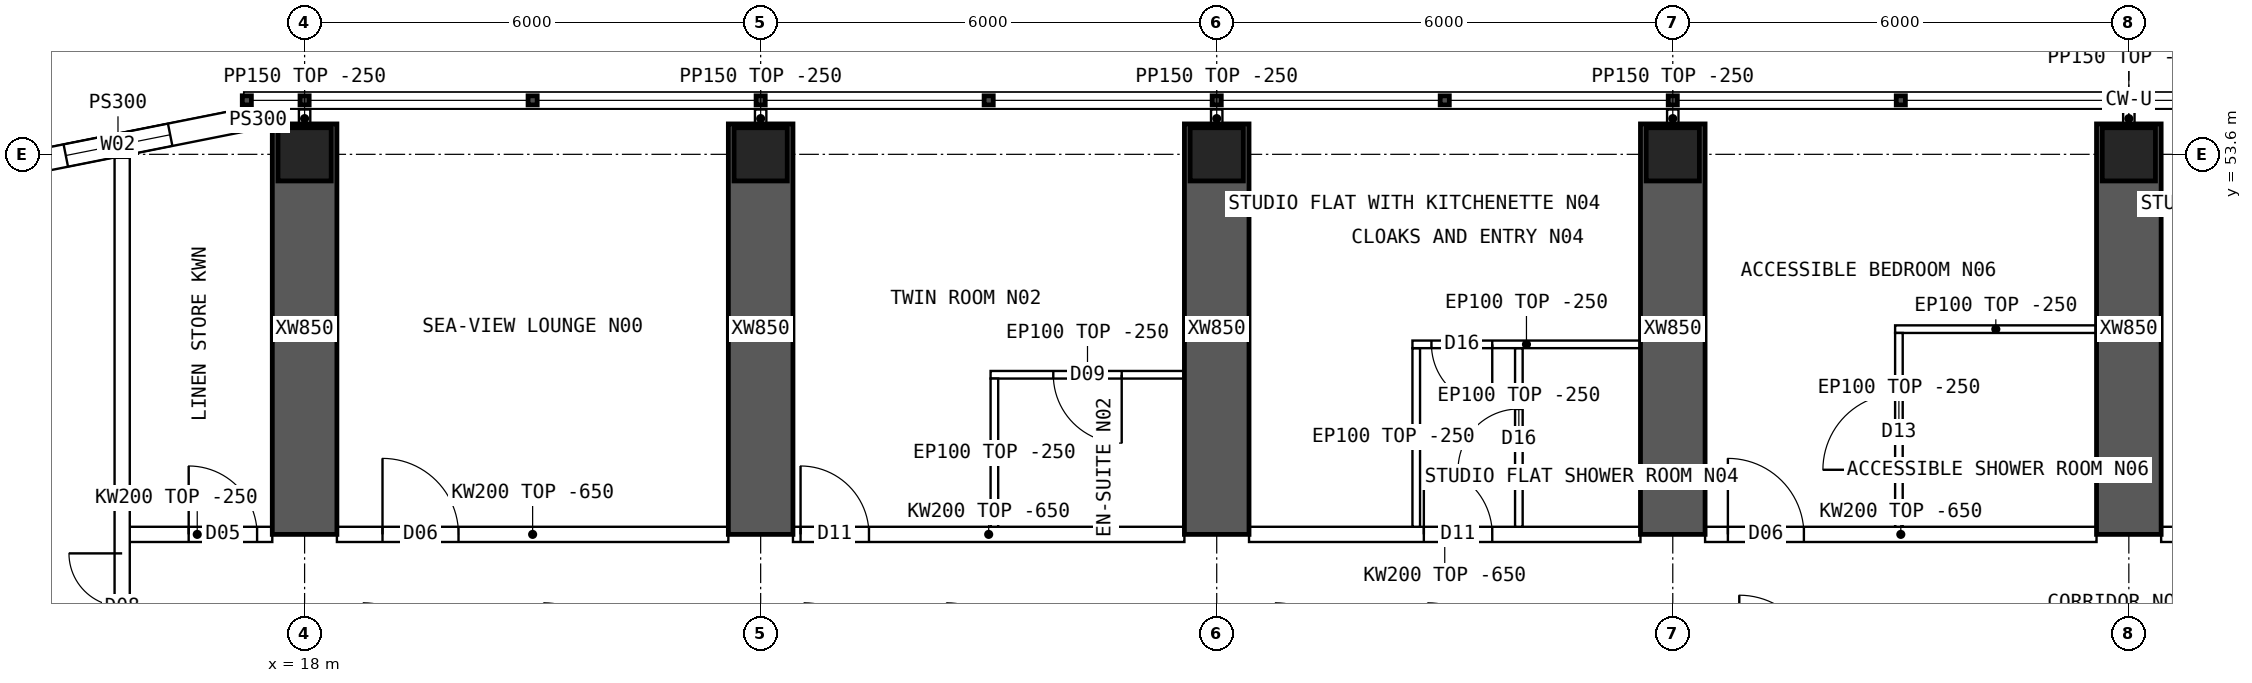
"""IFC4 building model, lengths in metres.
Left out: names, types, materials, properties, quantities, classifications, styles, units other than length and angle.
Written with IfcOpenShell. Run it as: python <this file> out.ifc"""

import sys

from ifc_helpers import new_model, si_unit, direction, frame, frame_2d, origin, origin_2d, place, context, subcontext, project, spatial, polyline, rectangle, hollow_rectangle, outline, extrude, element, fill, save


model = new_model("IFC4")
c1 = context("Model", 3, precision=1e-05, world=origin(), true_north=direction((0.0, 1.0)))
c2 = subcontext(c1, "Body", "Model", "MODEL_VIEW")
j1 = project(units=[si_unit("LENGTHUNIT", "METRE"), si_unit("PLANEANGLEUNIT", "RADIAN")], contexts=[c1])
p1 = place(None, origin())
s1 = spatial("IfcSite", under=j1, at=p1, CompositionType="ELEMENT")
p2 = place(p1, origin())
s2 = spatial("IfcBuilding", under=s1, at=p2, CompositionType="ELEMENT")
p3 = place(p2, frame((0.0, 0.0, 163.6)))
s3 = spatial("IfcBuildingStorey", under=s2, at=p3, CompositionType="ELEMENT", Elevation=163.6)
for number, where, z_axis, x_axis in (
    (1, (18.0, 53.6, 0.0), (0.0, 0.0, 1.0), (1.0, 0.0, 0.0)),
    (2, (24.0, 53.6, 0.0), (0.0, 0.0, 1.0), (1.0, 0.0, 0.0)),
    (3, (30.0, 53.6, 0.0), (0.0, 0.0, 1.0), (1.0, 0.0, 0.0)),
    (4, (36.0, 53.6, 0.0), (0.0, 0.0, 1.0), (1.0, 0.0, 0.0)),
    (5, (42.0, 53.6, 0.0), (0.0, 0.0, 1.0), (1.0, 0.0, 0.0)),
):
    element("IfcColumn", number, at=place(p3, frame(where, z_axis=z_axis, x_axis=x_axis)), inside=s3, PredefinedType="COLUMN", context=c2, shape_type="SweptSolid", body=[
        extrude(hollow_rectangle(XDim=0.7, YDim=0.7, WallThickness=0.07, at=origin_2d()), origin(), (0.0, 0.0, 1.0), 3.75),
    ])
for number, where, z_axis, x_axis in (
    (6, (18.0, 48.6, 0.0), (0.0, 0.0, 1.0), (0.0, 1.0, 0.0)),
    (7, (24.0, 48.6, 0.0), (0.0, 0.0, 1.0), (0.0, 1.0, 0.0)),
    (8, (30.0, 48.6, 0.0), (0.0, 0.0, 1.0), (0.0, 1.0, 0.0)),
    (9, (36.0, 48.6, 0.0), (0.0, 0.0, 1.0), (0.0, 1.0, 0.0)),
    (10, (42.0, 48.6, 0.0), (0.0, 0.0, 1.0), (0.0, 1.0, 0.0)),
):
    element("IfcWall", number, at=place(p3, frame(where, z_axis=z_axis, x_axis=x_axis)), inside=s3, PredefinedType="SHEAR", context=c2, shape_type="SweptSolid", body=[
        extrude(rectangle(XDim=5.4, YDim=0.85, at=frame_2d((2.7, 0.0))), origin(), (0.0, 0.0, 1.0), 3.75),
    ])
p4 = place(p3, frame((17.2, 54.05, 0.0), z_axis=(0.0, 0.0, 1.0), x_axis=(-0.98078325777, -0.195100490205, 0.0)))
e11 = element("IfcWall", 11, at=p4, inside=s3, PredefinedType="SOLIDWALL", context=c2, shape_type="SweptSolid", body=[
    extrude(outline(polyline([(-0.03, -0.15), (3.405, -0.15), (3.345, 0.15), (0.03, 0.15), (-0.03, -0.15)])), origin(), (0.0, 0.0, 1.0), 3.5),
])
p5 = place(p4, frame((0.988, 0.0, 0.9)))
e12 = element("IfcOpeningElement", 12, at=p5, cuts=e11, PredefinedType="OPENING", context=c2, shape_type="SweptSolid", body=[
    extrude(rectangle(XDim=1.4, YDim=1.8, at=frame_2d((0.7, 0.9))), frame((0.0, 0.16, 0.0), z_axis=(0.0, -1.0, 0.0), x_axis=(1.0, 0.0, 0.0)), (0.0, 0.0, 1.0), 0.32),
])
p6 = place(p3, frame((17.2, 54.05, 0.0), z_axis=(0.0, 0.0, 1.0), x_axis=(1.0, 0.0, 0.0)))
e13 = element("IfcWall", 13, at=p6, inside=s3, PredefinedType="SOLIDWALL", context=c2, shape_type="SweptSolid", body=[
    extrude(rectangle(XDim=0.375, YDim=0.3, at=frame_2d((0.188, 0.0))), origin(), (0.0, 0.0, 1.0), 3.5),
])
p7 = place(p3, frame((15.6, 48.6, 0.0), z_axis=(0.0, 0.0, 1.0), x_axis=(1.0, 0.0, 0.0)))
e14 = element("IfcWall", 14, at=p7, inside=s3, PredefinedType="SOLIDWALL", context=c2, shape_type="SweptSolid", body=[
    extrude(rectangle(XDim=1.975, YDim=0.2, at=frame_2d((0.987, 0.0))), origin(), (0.0, 0.0, 1.0), 3.5),
])
p8 = place(p7, frame((0.875, 0.0, 0.0)))
e15 = element("IfcOpeningElement", 15, at=p8, cuts=e14, PredefinedType="OPENING", context=c2, shape_type="SweptSolid", body=[
    extrude(rectangle(XDim=0.9, YDim=2.1, at=frame_2d((0.45, 1.05))), frame((0.0, 0.11, 0.0), z_axis=(0.0, -1.0, 0.0), x_axis=(1.0, 0.0, 0.0)), (0.0, 0.0, 1.0), 0.22),
])
p9 = place(p3, frame((18.425, 48.6, 0.0), z_axis=(0.0, 0.0, 1.0), x_axis=(1.0, 0.0, 0.0)))
e16 = element("IfcWall", 16, at=p9, inside=s3, PredefinedType="SOLIDWALL", context=c2, shape_type="SweptSolid", body=[
    extrude(outline(polyline([(0.0, 0.0), (5.15, 0.0), (5.15, 3.1), (0.0, 3.1), (0.0, 0.0)])), frame((0.0, 0.1, 0.0), z_axis=(0.0, -1.0, 0.0), x_axis=(1.0, 0.0, 0.0)), (0.0, 0.0, 1.0), 0.2),
])
p10 = place(p9, frame((0.6, 0.0, 0.0)))
e17 = element("IfcOpeningElement", 17, at=p10, cuts=e16, PredefinedType="OPENING", context=c2, shape_type="SweptSolid", body=[
    extrude(rectangle(XDim=1.0, YDim=2.1, at=frame_2d((0.5, 1.05))), frame((0.0, 0.11, 0.0), z_axis=(0.0, -1.0, 0.0), x_axis=(1.0, 0.0, 0.0)), (0.0, 0.0, 1.0), 0.22),
])
p11 = place(p3, frame((24.425, 48.6, 0.0), z_axis=(0.0, 0.0, 1.0), x_axis=(1.0, 0.0, 0.0)))
e18 = element("IfcWall", 18, at=p11, inside=s3, PredefinedType="SOLIDWALL", context=c2, shape_type="SweptSolid", body=[
    extrude(outline(polyline([(0.0, 0.0), (5.15, 0.0), (5.15, 3.1), (0.0, 3.1), (0.0, 0.0)])), frame((0.0, 0.1, 0.0), z_axis=(0.0, -1.0, 0.0), x_axis=(1.0, 0.0, 0.0)), (0.0, 0.0, 1.0), 0.2),
])
p12 = place(p11, frame((0.1, 0.0, 0.0)))
e19 = element("IfcOpeningElement", 19, at=p12, cuts=e18, PredefinedType="OPENING", context=c2, shape_type="SweptSolid", body=[
    extrude(rectangle(XDim=0.9, YDim=2.1, at=frame_2d((0.45, 1.05))), frame((0.0, 0.11, 0.0), z_axis=(0.0, -1.0, 0.0), x_axis=(1.0, 0.0, 0.0)), (0.0, 0.0, 1.0), 0.22),
])
p13 = place(p3, frame((30.425, 48.6, 0.0), z_axis=(0.0, 0.0, 1.0), x_axis=(1.0, 0.0, 0.0)))
e20 = element("IfcWall", 20, at=p13, inside=s3, PredefinedType="SOLIDWALL", context=c2, shape_type="SweptSolid", body=[
    extrude(outline(polyline([(0.0, 0.0), (5.15, 0.0), (5.15, 3.1), (0.0, 3.1), (0.0, 0.0)])), frame((0.0, 0.1, 0.0), z_axis=(0.0, -1.0, 0.0), x_axis=(1.0, 0.0, 0.0)), (0.0, 0.0, 1.0), 0.2),
])
p14 = place(p13, frame((2.3, 0.0, 0.0)))
e21 = element("IfcOpeningElement", 21, at=p14, cuts=e20, PredefinedType="OPENING", context=c2, shape_type="SweptSolid", body=[
    extrude(rectangle(XDim=0.9, YDim=2.1, at=frame_2d((0.45, 1.05))), frame((0.0, 0.11, 0.0), z_axis=(0.0, -1.0, 0.0), x_axis=(1.0, 0.0, 0.0)), (0.0, 0.0, 1.0), 0.22),
])
p15 = place(p3, frame((36.425, 48.6, 0.0), z_axis=(0.0, 0.0, 1.0), x_axis=(1.0, 0.0, 0.0)))
e22 = element("IfcWall", 22, at=p15, inside=s3, PredefinedType="SOLIDWALL", context=c2, shape_type="SweptSolid", body=[
    extrude(outline(polyline([(0.0, 0.0), (5.15, 0.0), (5.15, 3.1), (0.0, 3.1), (0.0, 0.0)])), frame((0.0, 0.1, 0.0), z_axis=(0.0, -1.0, 0.0), x_axis=(1.0, 0.0, 0.0)), (0.0, 0.0, 1.0), 0.2),
])
p16 = place(p15, frame((0.3, 0.0, 0.0)))
e23 = element("IfcOpeningElement", 23, at=p16, cuts=e22, PredefinedType="OPENING", context=c2, shape_type="SweptSolid", body=[
    extrude(rectangle(XDim=1.0, YDim=2.1, at=frame_2d((0.5, 1.05))), frame((0.0, 0.11, 0.0), z_axis=(0.0, -1.0, 0.0), x_axis=(1.0, 0.0, 0.0)), (0.0, 0.0, 1.0), 0.22),
])
p17 = place(p3, frame((42.425, 48.6, 0.0), z_axis=(0.0, 0.0, 1.0), x_axis=(1.0, 0.0, 0.0)))
e24 = element("IfcWall", 24, at=p17, inside=s3, PredefinedType="SOLIDWALL", context=c2, shape_type="SweptSolid", body=[
    extrude(outline(polyline([(0.0, 0.0), (5.15, 0.0), (5.15, 3.1), (0.0, 3.1), (0.0, 0.0)])), frame((0.0, 0.1, 0.0), z_axis=(0.0, -1.0, 0.0), x_axis=(1.0, 0.0, 0.0)), (0.0, 0.0, 1.0), 0.2),
])
p18 = place(p17, frame((2.3, 0.0, 0.0)))
e25 = element("IfcOpeningElement", 25, at=p18, cuts=e24, PredefinedType="OPENING", context=c2, shape_type="SweptSolid", body=[
    extrude(rectangle(XDim=0.9, YDim=2.1, at=frame_2d((0.45, 1.05))), frame((0.0, 0.11, 0.0), z_axis=(0.0, -1.0, 0.0), x_axis=(1.0, 0.0, 0.0)), (0.0, 0.0, 1.0), 0.22),
])
p19 = place(p3, frame((27.025, 50.7, 0.0), z_axis=(0.0, 0.0, 1.0), x_axis=(1.0, 0.0, 0.0)))
e26 = element("IfcWall", 26, at=p19, inside=s3, PredefinedType="PARTITIONING", context=c2, shape_type="SweptSolid", body=[
    extrude(rectangle(XDim=2.55, YDim=0.1, at=frame_2d((1.275, 0.0))), origin(), (0.0, 0.0, 1.0), 3.5),
])
p20 = place(p19, frame((0.825, 0.0, 0.0)))
e27 = element("IfcOpeningElement", 27, at=p20, cuts=e26, PredefinedType="OPENING", context=c2, shape_type="SweptSolid", body=[
    extrude(rectangle(XDim=0.9, YDim=2.1, at=frame_2d((0.45, 1.05))), frame((0.0, 0.06, 0.0), z_axis=(0.0, -1.0, 0.0), x_axis=(1.0, 0.0, 0.0)), (0.0, 0.0, 1.0), 0.12),
])
p21 = place(p3, frame((27.075, 50.65, 0.0), z_axis=(0.0, 0.0, 1.0), x_axis=(0.0, -1.0, 0.0)))
e28 = element("IfcWall", 28, at=p21, inside=s3, PredefinedType="PARTITIONING", context=c2, shape_type="SweptSolid", body=[
    extrude(outline(polyline([(0.0, 0.0), (1.95, 0.0), (1.95, 3.1), (1.902, 3.1), (1.9, 3.5), (0.0, 3.5), (0.0, 0.0)])), frame((0.0, 0.05, 0.0), z_axis=(0.0, -1.0, 0.0), x_axis=(1.0, 0.0, 0.0)), (0.0, 0.0, 1.0), 0.1),
])
p22 = place(p3, frame((32.575, 51.1, 0.0), z_axis=(0.0, 0.0, 1.0), x_axis=(1.0, 0.0, 0.0)))
e29 = element("IfcWall", 29, at=p22, inside=s3, PredefinedType="PARTITIONING", context=c2, shape_type="SweptSolid", body=[
    extrude(rectangle(XDim=3.0, YDim=0.1, at=frame_2d((1.5, 0.0))), origin(), (0.0, 0.0, 1.0), 3.5),
])
p23 = place(p22, frame((0.25, 0.0, 0.0)))
e30 = element("IfcOpeningElement", 30, at=p23, cuts=e29, PredefinedType="OPENING", context=c2, shape_type="SweptSolid", body=[
    extrude(rectangle(XDim=0.8, YDim=2.1, at=frame_2d((0.4, 1.05))), frame((0.0, 0.06, 0.0), z_axis=(0.0, -1.0, 0.0), x_axis=(1.0, 0.0, 0.0)), (0.0, 0.0, 1.0), 0.12),
])
p24 = place(p3, frame((32.625, 51.05, 0.0), z_axis=(0.0, 0.0, 1.0), x_axis=(0.0, -1.0, 0.0)))
e31 = element("IfcWall", 31, at=p24, inside=s3, PredefinedType="PARTITIONING", context=c2, shape_type="SweptSolid", body=[
    extrude(outline(polyline([(0.0, 0.0), (2.35, 0.0), (2.35, 3.1), (2.302, 3.1), (2.3, 3.5), (0.0, 3.5), (0.0, 0.0)])), frame((0.0, 0.05, 0.0), z_axis=(0.0, -1.0, 0.0), x_axis=(1.0, 0.0, 0.0)), (0.0, 0.0, 1.0), 0.1),
])
p25 = place(p3, frame((33.975, 51.05, 0.0), z_axis=(0.0, 0.0, 1.0), x_axis=(0.0, -1.0, 0.0)))
e32 = element("IfcWall", 32, at=p25, inside=s3, PredefinedType="PARTITIONING", context=c2, shape_type="SweptSolid", body=[
    extrude(outline(polyline([(0.0, 0.0), (2.35, 0.0), (2.35, 3.1), (2.302, 3.1), (2.3, 3.5), (0.0, 3.5), (0.0, 0.0)])), frame((0.0, 0.05, 0.0), z_axis=(0.0, -1.0, 0.0), x_axis=(1.0, 0.0, 0.0)), (0.0, 0.0, 1.0), 0.1),
])
p26 = place(p25, frame((0.8, 0.0, 0.0)))
e33 = element("IfcOpeningElement", 33, at=p26, cuts=e32, PredefinedType="OPENING", context=c2, shape_type="SweptSolid", body=[
    extrude(rectangle(XDim=0.8, YDim=2.1, at=frame_2d((0.4, 1.05))), frame((0.0, 0.06, 0.0), z_axis=(0.0, -1.0, 0.0), x_axis=(1.0, 0.0, 0.0)), (0.0, 0.0, 1.0), 0.12),
])
p27 = place(p3, frame((38.925, 51.3, 0.0), z_axis=(0.0, 0.0, 1.0), x_axis=(1.0, 0.0, 0.0)))
e34 = element("IfcWall", 34, at=p27, inside=s3, PredefinedType="PARTITIONING", context=c2, shape_type="SweptSolid", body=[
    extrude(rectangle(XDim=2.65, YDim=0.1, at=frame_2d((1.325, 0.0))), origin(), (0.0, 0.0, 1.0), 3.5),
])
p28 = place(p3, frame((38.975, 51.25, 0.0), z_axis=(0.0, 0.0, 1.0), x_axis=(0.0, -1.0, 0.0)))
e35 = element("IfcWall", 35, at=p28, inside=s3, PredefinedType="PARTITIONING", context=c2, shape_type="SweptSolid", body=[
    extrude(outline(polyline([(0.0, 0.0), (2.55, 0.0), (2.55, 3.1), (2.502, 3.1), (2.5, 3.5), (0.0, 3.5), (0.0, 0.0)])), frame((0.0, 0.05, 0.0), z_axis=(0.0, -1.0, 0.0), x_axis=(1.0, 0.0, 0.0)), (0.0, 0.0, 1.0), 0.1),
])
p29 = place(p28, frame((0.8, 0.0, 0.0)))
e36 = element("IfcOpeningElement", 36, at=p29, cuts=e35, PredefinedType="OPENING", context=c2, shape_type="SweptSolid", body=[
    extrude(rectangle(XDim=1.0, YDim=2.1, at=frame_2d((0.5, 1.05))), frame((0.0, 0.06, 0.0), z_axis=(0.0, -1.0, 0.0), x_axis=(1.0, 0.0, 0.0)), (0.0, 0.0, 1.0), 0.12),
])
p30 = place(p3, frame((15.6, 10.446, 0.0), z_axis=(0.0, 0.0, 1.0), x_axis=(0.0, 1.0, 0.0)))
e37 = element("IfcWall", 37, at=p30, inside=s3, PredefinedType="SOLIDWALL", context=c2, shape_type="SweptSolid", body=[
    extrude(rectangle(XDim=43.107, YDim=0.2, at=frame_2d((21.554, 0.0))), origin(), (0.0, 0.0, 1.0), 3.5),
])
p31 = place(p30, frame((13.914, 0.0, 0.0)))
e38 = element("IfcOpeningElement", 38, at=p31, cuts=e37, PredefinedType="OPENING", context=c2, shape_type="SweptSolid", body=[
    extrude(rectangle(XDim=1.2, YDim=2.1, at=frame_2d((0.6, 1.05))), frame((0.0, 0.11, 0.0), z_axis=(0.0, -1.0, 0.0), x_axis=(1.0, 0.0, 0.0)), (0.0, 0.0, 1.0), 0.22),
])
p32 = place(p30, frame((5.104, 0.0, 0.0)))
e39 = element("IfcOpeningElement", 39, at=p32, cuts=e37, PredefinedType="OPENING", context=c2, shape_type="SweptSolid", body=[
    extrude(rectangle(XDim=1.4, YDim=2.1, at=frame_2d((0.7, 1.05))), frame((0.0, 0.11, 0.0), z_axis=(0.0, -1.0, 0.0), x_axis=(1.0, 0.0, 0.0)), (0.0, 0.0, 1.0), 0.22),
])
p33 = place(p30, frame((36.504, 0.0, 0.0)))
e40 = element("IfcOpeningElement", 40, at=p33, cuts=e37, PredefinedType="OPENING", context=c2, shape_type="SweptSolid", body=[
    extrude(rectangle(XDim=1.4, YDim=2.1, at=frame_2d((0.7, 1.05))), frame((0.0, 0.11, 0.0), z_axis=(0.0, -1.0, 0.0), x_axis=(1.0, 0.0, 0.0)), (0.0, 0.0, 1.0), 0.22),
])
for number, where, z_axis, x_axis in (
    (41, (18.0, 53.95, 0.0), (0.0, 0.0, 1.0), (0.0, 1.0, 0.0)),
    (42, (24.0, 53.95, 0.0), (0.0, 0.0, 1.0), (0.0, 1.0, 0.0)),
    (43, (30.0, 53.95, 0.0), (0.0, 0.0, 1.0), (0.0, 1.0, 0.0)),
    (44, (36.0, 53.95, 0.0), (0.0, 0.0, 1.0), (0.0, 1.0, 0.0)),
    (45, (42.0, 53.95, 0.0), (0.0, 0.0, 1.0), (0.0, 1.0, 0.0)),
):
    element("IfcWall", number, at=place(p3, frame(where, z_axis=z_axis, x_axis=x_axis)), inside=s3, PredefinedType="PARTITIONING", context=c2, shape_type="SweptSolid", body=[
        extrude(rectangle(XDim=0.24, YDim=0.15, at=frame_2d((0.12, 0.0))), origin(), (0.0, 0.0, 1.0), 3.5),
    ])
p34 = place(p5, origin())
e46 = element("IfcWindow", 46, at=p34, inside=s3, PartitioningType="SINGLE_PANEL", PredefinedType="WINDOW", context=c2, shape_type="SweptSolid", body=[
    extrude(rectangle(XDim=1.4, YDim=1.8, at=frame_2d((0.7, 0.9))), frame((0.0, 0.03, 0.0), z_axis=(0.0, -1.0, 0.0), x_axis=(1.0, 0.0, 0.0)), (0.0, 0.0, 1.0), 0.06),
])
fill(e12, e46)
p35 = place(p10, origin())
e47 = element("IfcDoor", 47, at=p35, inside=s3, OperationType="SINGLE_SWING_LEFT", PredefinedType="DOOR", context=c2, shape_type="SweptSolid", body=[
    extrude(rectangle(XDim=1.0, YDim=2.1, at=frame_2d((0.5, 1.05))), frame((0.0, 0.025, 0.0), z_axis=(0.0, -1.0, 0.0), x_axis=(1.0, 0.0, 0.0)), (0.0, 0.0, 1.0), 0.05),
])
fill(e17, e47)
p36 = place(p20, origin())
e48 = element("IfcDoor", 48, at=p36, inside=s3, OperationType="SINGLE_SWING_RIGHT", PredefinedType="DOOR", context=c2, shape_type="SweptSolid", body=[
    extrude(rectangle(XDim=0.9, YDim=2.1, at=frame_2d((0.45, 1.05))), frame((0.0, 0.025, 0.0), z_axis=(0.0, -1.0, 0.0), x_axis=(1.0, 0.0, 0.0)), (0.0, 0.0, 1.0), 0.05),
])
fill(e27, e48)
p37 = place(p12, origin())
e49 = element("IfcDoor", 49, at=p37, inside=s3, OperationType="SINGLE_SWING_LEFT", PredefinedType="DOOR", context=c2, shape_type="SweptSolid", body=[
    extrude(rectangle(XDim=0.9, YDim=2.1, at=frame_2d((0.45, 1.05))), frame((0.0, 0.025, 0.0), z_axis=(0.0, -1.0, 0.0), x_axis=(1.0, 0.0, 0.0)), (0.0, 0.0, 1.0), 0.05),
])
fill(e19, e49)
p38 = place(p23, origin())
e50 = element("IfcDoor", 50, at=p38, inside=s3, OperationType="SINGLE_SWING_RIGHT", PredefinedType="DOOR", context=c2, shape_type="SweptSolid", body=[
    extrude(rectangle(XDim=0.8, YDim=2.1, at=frame_2d((0.4, 1.05))), frame((0.0, 0.025, 0.0), z_axis=(0.0, -1.0, 0.0), x_axis=(1.0, 0.0, 0.0)), (0.0, 0.0, 1.0), 0.05),
])
fill(e30, e50)
p39 = place(p26, origin())
e51 = element("IfcDoor", 51, at=p39, inside=s3, OperationType="SINGLE_SWING_RIGHT", PredefinedType="DOOR", context=c2, shape_type="SweptSolid", body=[
    extrude(rectangle(XDim=0.8, YDim=2.1, at=frame_2d((0.4, 1.05))), frame((0.0, 0.025, 0.0), z_axis=(0.0, -1.0, 0.0), x_axis=(1.0, 0.0, 0.0)), (0.0, 0.0, 1.0), 0.05),
])
fill(e33, e51)
p40 = place(p14, origin())
e52 = element("IfcDoor", 52, at=p40, inside=s3, OperationType="SINGLE_SWING_LEFT", PredefinedType="DOOR", context=c2, shape_type="SweptSolid", body=[
    extrude(rectangle(XDim=0.9, YDim=2.1, at=frame_2d((0.45, 1.05))), frame((0.0, 0.025, 0.0), z_axis=(0.0, -1.0, 0.0), x_axis=(1.0, 0.0, 0.0)), (0.0, 0.0, 1.0), 0.05),
])
fill(e21, e52)
p41 = place(p29, origin())
e53 = element("IfcDoor", 53, at=p41, inside=s3, OperationType="SINGLE_SWING_RIGHT", PredefinedType="DOOR", context=c2, shape_type="SweptSolid", body=[
    extrude(rectangle(XDim=1.0, YDim=2.1, at=frame_2d((0.5, 1.05))), frame((0.0, 0.025, 0.0), z_axis=(0.0, -1.0, 0.0), x_axis=(1.0, 0.0, 0.0)), (0.0, 0.0, 1.0), 0.05),
])
fill(e36, e53)
p42 = place(p16, origin())
e54 = element("IfcDoor", 54, at=p42, inside=s3, OperationType="SINGLE_SWING_LEFT", PredefinedType="DOOR", context=c2, shape_type="SweptSolid", body=[
    extrude(rectangle(XDim=1.0, YDim=2.1, at=frame_2d((0.5, 1.05))), frame((0.0, 0.025, 0.0), z_axis=(0.0, -1.0, 0.0), x_axis=(1.0, 0.0, 0.0)), (0.0, 0.0, 1.0), 0.05),
])
fill(e23, e54)
p43 = place(p33, origin())
e55 = element("IfcDoor", 55, at=p43, inside=s3, OperationType="DOUBLE_DOOR_SINGLE_SWING", PredefinedType="DOOR", context=c2, shape_type="SweptSolid", body=[
    extrude(rectangle(XDim=1.4, YDim=2.1, at=frame_2d((0.7, 1.05))), frame((0.0, 0.025, 0.0), z_axis=(0.0, -1.0, 0.0), x_axis=(1.0, 0.0, 0.0)), (0.0, 0.0, 1.0), 0.05),
])
fill(e40, e55)
p44 = place(p8, origin())
e56 = element("IfcDoor", 56, at=p44, inside=s3, OperationType="SINGLE_SWING_LEFT", PredefinedType="DOOR", context=c2, shape_type="SweptSolid", body=[
    extrude(rectangle(XDim=0.9, YDim=2.1, at=frame_2d((0.45, 1.05))), frame((0.0, 0.025, 0.0), z_axis=(0.0, -1.0, 0.0), x_axis=(1.0, 0.0, 0.0)), (0.0, 0.0, 1.0), 0.05),
])
fill(e15, e56)
save(model, sys.argv[1])
